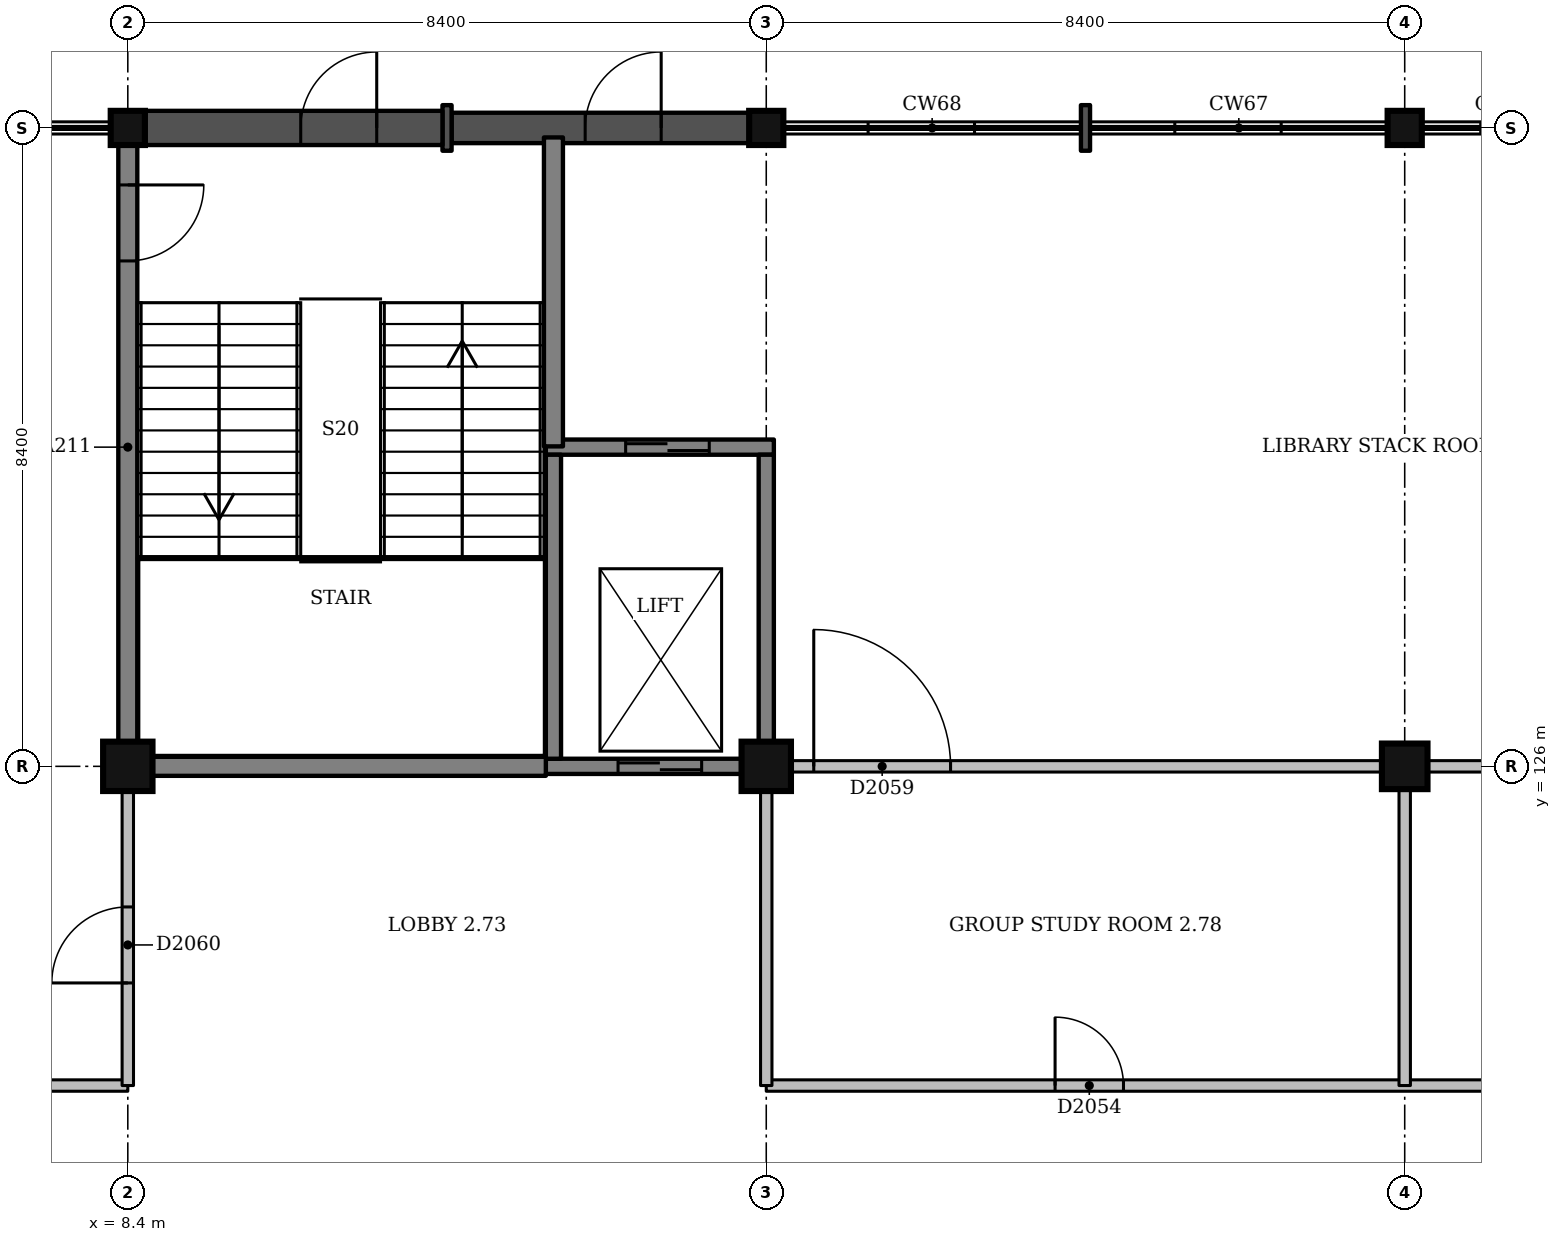
"""IFC4 building model, lengths in metres.
Left out: names, types, materials, properties, quantities, classifications, styles, units other than length and angle.
Written with IfcOpenShell. Run it as: python <this file> out.ifc"""

import sys

from ifc_helpers import new_model, si_unit, direction, frame, frame_2d, origin, origin_2d, place, context, subcontext, project, spatial, rectangle, extrude, element, fill, save


model = new_model("IFC4")
c1 = context("Model", 3, precision=1e-05, world=origin(), true_north=direction((0.0, 1.0)))
c2 = subcontext(c1, "Body", "Model", "MODEL_VIEW")
j1 = project(units=[si_unit("LENGTHUNIT", "METRE"), si_unit("PLANEANGLEUNIT", "RADIAN")], contexts=[c1])
p1 = place(None, origin())
s1 = spatial("IfcSite", under=j1, at=p1, CompositionType="ELEMENT")
p2 = place(p1, origin())
s2 = spatial("IfcBuilding", under=s1, at=p2, CompositionType="ELEMENT")
p3 = place(p2, frame((0.0, 0.0, 9.0)))
s3 = spatial("IfcBuildingStorey", under=s2, at=p3, CompositionType="ELEMENT", Elevation=9.0)
p4 = place(p3, frame((8.4, 126.0, -1.5), z_axis=(0.0, 0.0, 1.0), x_axis=(1.0, 0.0, 0.0)))
e1 = element("IfcColumn", 1, at=p4, inside=s3, PredefinedType="COLUMN", context=c2, shape_type="SweptSolid", body=[
    extrude(rectangle(XDim=0.65, YDim=0.65, at=origin_2d()), origin(), (0.0, 0.0, 1.0), 6.0),
])
p5 = place(p3, frame((8.4, 134.4, -1.5), z_axis=(0.0, 0.0, 1.0), x_axis=(1.0, 0.0, 0.0)))
e2 = element("IfcColumn", 2, at=p5, inside=s3, PredefinedType="COLUMN", context=c2, shape_type="SweptSolid", body=[
    extrude(rectangle(XDim=0.45, YDim=0.45, at=origin_2d()), origin(), (0.0, 0.0, 1.0), 6.0),
])
p6 = place(p3, frame((16.8, 126.0, -1.5), z_axis=(0.0, 0.0, 1.0), x_axis=(1.0, 0.0, 0.0)))
e3 = element("IfcColumn", 3, at=p6, inside=s3, PredefinedType="COLUMN", context=c2, shape_type="SweptSolid", body=[
    extrude(rectangle(XDim=0.65, YDim=0.65, at=origin_2d()), origin(), (0.0, 0.0, 1.0), 6.0),
])
p7 = place(p3, frame((16.8, 134.4, -1.5), z_axis=(0.0, 0.0, 1.0), x_axis=(1.0, 0.0, 0.0)))
e4 = element("IfcColumn", 4, at=p7, inside=s3, PredefinedType="COLUMN", context=c2, shape_type="SweptSolid", body=[
    extrude(rectangle(XDim=0.45, YDim=0.45, at=origin_2d()), origin(), (0.0, 0.0, 1.0), 6.0),
])
p8 = place(p3, frame((25.2, 126.0, -1.5), z_axis=(0.0, 0.0, 1.0), x_axis=(1.0, 0.0, 0.0)))
e5 = element("IfcColumn", 5, at=p8, inside=s3, PredefinedType="COLUMN", context=c2, shape_type="SweptSolid", body=[
    extrude(rectangle(XDim=0.6, YDim=0.6, at=origin_2d()), origin(), (0.0, 0.0, 1.0), 6.0),
])
p9 = place(p3, frame((25.2, 134.4, -1.5), z_axis=(0.0, 0.0, 1.0), x_axis=(1.0, 0.0, 0.0)))
e6 = element("IfcColumn", 6, at=p9, inside=s3, PredefinedType="COLUMN", context=c2, shape_type="SweptSolid", body=[
    extrude(rectangle(XDim=0.45, YDim=0.45, at=origin_2d()), origin(), (0.0, 0.0, 1.0), 6.0),
])
p10 = place(p3, frame((13.9, 126.0, 0.0), z_axis=(0.0, 0.0, 1.0), x_axis=(1.0, 0.0, 0.0)))
e7 = element("IfcWall", 7, at=p10, inside=s3, PredefinedType="SHEAR", context=c2, shape_type="SweptSolid", body=[
    extrude(rectangle(XDim=2.575, YDim=0.2, at=frame_2d((1.288, 0.0))), origin(), (0.0, 0.0, 1.0), 4.5),
])
p11 = place(p10, frame((0.95, 0.0, 0.0)))
e8 = element("IfcOpeningElement", 8, at=p11, cuts=e7, PredefinedType="OPENING", context=c2, shape_type="SweptSolid", body=[
    extrude(rectangle(XDim=1.1, YDim=2.1, at=frame_2d((0.55, 1.05))), frame((0.0, 0.11, 0.0), z_axis=(0.0, -1.0, 0.0), x_axis=(1.0, 0.0, 0.0)), (0.0, 0.0, 1.0), 0.22),
])
p12 = place(p3, frame((13.9, 130.2, 0.0), z_axis=(0.0, 0.0, 1.0), x_axis=(1.0, 0.0, 0.0)))
e9 = element("IfcWall", 9, at=p12, inside=s3, PredefinedType="SHEAR", context=c2, shape_type="SweptSolid", body=[
    extrude(rectangle(XDim=3.0, YDim=0.2, at=frame_2d((1.5, 0.0))), origin(), (0.0, 0.0, 1.0), 4.5),
])
p13 = place(p12, frame((1.05, 0.0, 0.0)))
e10 = element("IfcOpeningElement", 10, at=p13, cuts=e9, PredefinedType="OPENING", context=c2, shape_type="SweptSolid", body=[
    extrude(rectangle(XDim=1.1, YDim=2.1, at=frame_2d((0.55, 1.05))), frame((0.0, 0.11, 0.0), z_axis=(0.0, -1.0, 0.0), x_axis=(1.0, 0.0, 0.0)), (0.0, 0.0, 1.0), 0.22),
])
p14 = place(p3, frame((14.0, 126.1, 0.0), z_axis=(0.0, 0.0, 1.0), x_axis=(0.0, 1.0, 0.0)))
e11 = element("IfcWall", 11, at=p14, inside=s3, PredefinedType="SHEAR", context=c2, shape_type="SweptSolid", body=[
    extrude(rectangle(XDim=4.0, YDim=0.2, at=frame_2d((2.0, 0.0))), origin(), (0.0, 0.0, 1.0), 4.5),
])
p15 = place(p3, frame((16.8, 126.325, 0.0), z_axis=(0.0, 0.0, 1.0), x_axis=(0.0, 1.0, 0.0)))
e12 = element("IfcWall", 12, at=p15, inside=s3, PredefinedType="SHEAR", context=c2, shape_type="SweptSolid", body=[
    extrude(rectangle(XDim=3.775, YDim=0.2, at=frame_2d((1.888, 0.0))), origin(), (0.0, 0.0, 1.0), 4.5),
])
p16 = place(p3, frame((8.725, 126.0, 0.0), z_axis=(0.0, 0.0, 1.0), x_axis=(1.0, 0.0, 0.0)))
e13 = element("IfcWall", 13, at=p16, inside=s3, PredefinedType="SHEAR", context=c2, shape_type="SweptSolid", body=[
    extrude(rectangle(XDim=5.175, YDim=0.25, at=frame_2d((2.587, 0.0))), origin(), (0.0, 0.0, 1.0), 4.5),
])
p17 = place(p3, frame((8.4, 126.325, 0.0), z_axis=(0.0, 0.0, 1.0), x_axis=(0.0, 1.0, 0.0)))
e14 = element("IfcWall", 14, at=p17, inside=s3, PredefinedType="SHEAR", context=c2, shape_type="SweptSolid", body=[
    extrude(rectangle(XDim=7.85, YDim=0.25, at=frame_2d((3.925, 0.0))), origin(), (0.0, 0.0, 1.0), 4.5),
])
p18 = place(p17, frame((6.325, 0.0, 0.0)))
e15 = element("IfcOpeningElement", 15, at=p18, cuts=e14, PredefinedType="OPENING", context=c2, shape_type="SweptSolid", body=[
    extrude(rectangle(XDim=1.0, YDim=2.1, at=frame_2d((0.5, 1.05))), frame((0.0, 0.135, 0.0), z_axis=(0.0, -1.0, 0.0), x_axis=(1.0, 0.0, 0.0)), (0.0, 0.0, 1.0), 0.27),
])
p19 = place(p3, frame((14.0, 130.21, 0.0), z_axis=(0.0, 0.0, 1.0), x_axis=(0.0, 1.0, 0.0)))
e16 = element("IfcWall", 16, at=p19, inside=s3, PredefinedType="SHEAR", context=c2, shape_type="SweptSolid", body=[
    extrude(rectangle(XDim=4.065, YDim=0.25, at=frame_2d((2.032, 0.0))), origin(), (0.0, 0.0, 1.0), 4.5),
])
p20 = place(p3, frame((21.06, 134.4, 0.0), z_axis=(0.0, 0.0, 1.0), x_axis=(-1.0, 0.0, 0.0)))
e17 = element("IfcWall", 17, at=p20, inside=s3, PredefinedType="SOLIDWALL", context=c2, shape_type="SweptSolid", body=[
    extrude(rectangle(XDim=0.12, YDim=0.6, at=frame_2d((0.06, 0.0))), origin(), (0.0, 0.0, 1.0), 3.35),
])
p21 = place(p3, frame((16.575, 134.4, 0.0), z_axis=(0.0, 0.0, 1.0), x_axis=(-1.0, 0.0, 0.0)))
e18 = element("IfcWall", 18, at=p21, inside=s3, PredefinedType="SOLIDWALL", context=c2, shape_type="SweptSolid", body=[
    extrude(rectangle(XDim=3.915, YDim=0.4, at=frame_2d((1.958, 0.0))), origin(), (0.0, 0.0, 1.0), 3.35),
])
p22 = place(p21, frame((1.157, 0.0, 0.0)))
e19 = element("IfcOpeningElement", 19, at=p22, cuts=e18, PredefinedType="OPENING", context=c2, shape_type="SweptSolid", body=[
    extrude(rectangle(XDim=1.0, YDim=2.1, at=frame_2d((0.5, 1.05))), frame((0.0, 0.21, 0.0), z_axis=(0.0, -1.0, 0.0), x_axis=(1.0, 0.0, 0.0)), (0.0, 0.0, 1.0), 0.42),
])
p23 = place(p3, frame((12.66, 134.4, 0.0), z_axis=(0.0, 0.0, 1.0), x_axis=(-1.0, 0.0, 0.0)))
e20 = element("IfcWall", 20, at=p23, inside=s3, PredefinedType="SOLIDWALL", context=c2, shape_type="SweptSolid", body=[
    extrude(rectangle(XDim=0.12, YDim=0.6, at=frame_2d((0.06, 0.0))), origin(), (0.0, 0.0, 1.0), 3.35),
])
p24 = place(p3, frame((12.54, 134.4, 0.0), z_axis=(0.0, 0.0, 1.0), x_axis=(-1.0, 0.0, 0.0)))
e21 = element("IfcWall", 21, at=p24, inside=s3, PredefinedType="SOLIDWALL", context=c2, shape_type="SweptSolid", body=[
    extrude(rectangle(XDim=3.915, YDim=0.45, at=frame_2d((1.958, 0.0))), origin(), (0.0, 0.0, 1.0), 3.35),
])
p25 = place(p24, frame((1.865, 0.0, 0.0), z_axis=(0.0, 0.0, 1.0), x_axis=(-1.0, 0.0, 0.0)))
e22 = element("IfcOpeningElement", 22, at=p25, cuts=e21, PredefinedType="OPENING", context=c2, shape_type="SweptSolid", body=[
    extrude(rectangle(XDim=1.0, YDim=2.1, at=frame_2d((0.5, 1.05))), frame((0.0, 0.235, 0.0), z_axis=(0.0, -1.0, 0.0), x_axis=(1.0, 0.0, 0.0)), (0.0, 0.0, 1.0), 0.47),
])
p26 = place(p3, frame((0.275, 121.8, 0.0), z_axis=(0.0, 0.0, 1.0), x_axis=(1.0, 0.0, 0.0)))
e23 = element("IfcWall", 23, at=p26, inside=s3, PredefinedType="PARTITIONING", context=c2, shape_type="SweptSolid", body=[
    extrude(rectangle(XDim=8.125, YDim=0.15, at=frame_2d((4.062, 0.0))), origin(), (0.0, 0.0, 1.0), 3.4),
])
p27 = place(p3, frame((16.8, 121.8, 0.0), z_axis=(0.0, 0.0, 1.0), x_axis=(1.0, 0.0, 0.0)))
e24 = element("IfcWall", 24, at=p27, inside=s3, PredefinedType="PARTITIONING", context=c2, shape_type="SweptSolid", body=[
    extrude(rectangle(XDim=25.2, YDim=0.15, at=frame_2d((12.6, 0.0))), origin(), (0.0, 0.0, 1.0), 3.4),
])
p28 = place(p27, frame((3.8, 0.0, 0.0)))
e25 = element("IfcOpeningElement", 25, at=p28, cuts=e24, PredefinedType="OPENING", context=c2, shape_type="SweptSolid", body=[
    extrude(rectangle(XDim=0.9, YDim=2.1, at=frame_2d((0.45, 1.05))), frame((0.0, 0.085, 0.0), z_axis=(0.0, -1.0, 0.0), x_axis=(1.0, 0.0, 0.0)), (0.0, 0.0, 1.0), 0.17),
])
p29 = place(p27, frame((12.2, 0.0, 0.0)))
e26 = element("IfcOpeningElement", 26, at=p29, cuts=e24, PredefinedType="OPENING", context=c2, shape_type="SweptSolid", body=[
    extrude(rectangle(XDim=0.9, YDim=2.1, at=frame_2d((0.45, 1.05))), frame((0.0, 0.085, 0.0), z_axis=(0.0, -1.0, 0.0), x_axis=(1.0, 0.0, 0.0)), (0.0, 0.0, 1.0), 0.17),
])
p30 = place(p27, frame((20.6, 0.0, 0.0)))
e27 = element("IfcOpeningElement", 27, at=p30, cuts=e24, PredefinedType="OPENING", context=c2, shape_type="SweptSolid", body=[
    extrude(rectangle(XDim=0.9, YDim=2.1, at=frame_2d((0.45, 1.05))), frame((0.0, 0.085, 0.0), z_axis=(0.0, -1.0, 0.0), x_axis=(1.0, 0.0, 0.0)), (0.0, 0.0, 1.0), 0.17),
])
p31 = place(p3, frame((17.125, 126.0, 0.0), z_axis=(0.0, 0.0, 1.0), x_axis=(1.0, 0.0, 0.0)))
e28 = element("IfcWall", 28, at=p31, inside=s3, PredefinedType="PARTITIONING", context=c2, shape_type="SweptSolid", body=[
    extrude(rectangle(XDim=7.775, YDim=0.15, at=frame_2d((3.887, 0.0))), origin(), (0.0, 0.0, 1.0), 3.4),
])
p32 = place(p31, frame((0.3, 0.0, 0.0)))
e29 = element("IfcOpeningElement", 29, at=p32, cuts=e28, PredefinedType="OPENING", context=c2, shape_type="SweptSolid", body=[
    extrude(rectangle(XDim=1.8, YDim=2.1, at=frame_2d((0.9, 1.05))), frame((0.0, 0.085, 0.0), z_axis=(0.0, -1.0, 0.0), x_axis=(1.0, 0.0, 0.0)), (0.0, 0.0, 1.0), 0.17),
])
p33 = place(p3, frame((25.5, 126.0, 0.0), z_axis=(0.0, 0.0, 1.0), x_axis=(1.0, 0.0, 0.0)))
e30 = element("IfcWall", 30, at=p33, inside=s3, PredefinedType="PARTITIONING", context=c2, shape_type="SweptSolid", body=[
    extrude(rectangle(XDim=7.8, YDim=0.15, at=frame_2d((3.9, 0.0))), origin(), (0.0, 0.0, 1.0), 3.4),
])
p34 = place(p3, frame((8.4, 121.8, 0.0), z_axis=(0.0, 0.0, 1.0), x_axis=(0.0, 1.0, 0.0)))
e31 = element("IfcWall", 31, at=p34, inside=s3, PredefinedType="PARTITIONING", context=c2, shape_type="SweptSolid", body=[
    extrude(rectangle(XDim=3.875, YDim=0.15, at=frame_2d((1.938, 0.0))), origin(), (0.0, 0.0, 1.0), 3.4),
])
p35 = place(p34, frame((1.35, 0.0, 0.0)))
e32 = element("IfcOpeningElement", 32, at=p35, cuts=e31, PredefinedType="OPENING", context=c2, shape_type="SweptSolid", body=[
    extrude(rectangle(XDim=1.0, YDim=2.1, at=frame_2d((0.5, 1.05))), frame((0.0, 0.085, 0.0), z_axis=(0.0, -1.0, 0.0), x_axis=(1.0, 0.0, 0.0)), (0.0, 0.0, 1.0), 0.17),
])
p36 = place(p3, frame((16.8, 121.8, 0.0), z_axis=(0.0, 0.0, 1.0), x_axis=(0.0, 1.0, 0.0)))
e33 = element("IfcWall", 33, at=p36, inside=s3, PredefinedType="PARTITIONING", context=c2, shape_type="SweptSolid", body=[
    extrude(rectangle(XDim=3.875, YDim=0.15, at=frame_2d((1.938, 0.0))), origin(), (0.0, 0.0, 1.0), 3.4),
])
p37 = place(p3, frame((25.2, 121.8, 0.0), z_axis=(0.0, 0.0, 1.0), x_axis=(0.0, 1.0, 0.0)))
e34 = element("IfcWall", 34, at=p37, inside=s3, PredefinedType="PARTITIONING", context=c2, shape_type="SweptSolid", body=[
    extrude(rectangle(XDim=3.9, YDim=0.15, at=frame_2d((1.95, 0.0))), origin(), (0.0, 0.0, 1.0), 3.4),
])
p38 = place(p22, origin())
e35 = element("IfcDoor", 35, at=p38, inside=s3, OperationType="SINGLE_SWING_LEFT", PredefinedType="DOOR", context=c2, shape_type="SweptSolid", body=[
    extrude(rectangle(XDim=1.0, YDim=2.1, at=frame_2d((0.5, 1.05))), frame((0.0, 0.025, 0.0), z_axis=(0.0, -1.0, 0.0), x_axis=(1.0, 0.0, 0.0)), (0.0, 0.0, 1.0), 0.05),
])
fill(e19, e35)
p39 = place(p28, origin())
e36 = element("IfcDoor", 36, at=p39, inside=s3, OperationType="SINGLE_SWING_LEFT", PredefinedType="DOOR", context=c2, shape_type="SweptSolid", body=[
    extrude(rectangle(XDim=0.9, YDim=2.1, at=frame_2d((0.45, 1.05))), frame((0.0, 0.025, 0.0), z_axis=(0.0, -1.0, 0.0), x_axis=(1.0, 0.0, 0.0)), (0.0, 0.0, 1.0), 0.05),
])
fill(e25, e36)
p40 = place(p32, origin())
e37 = element("IfcDoor", 37, at=p40, inside=s3, OperationType="DOUBLE_DOOR_SINGLE_SWING", PredefinedType="DOOR", context=c2, shape_type="SweptSolid", body=[
    extrude(rectangle(XDim=1.8, YDim=2.1, at=frame_2d((0.9, 1.05))), frame((0.0, 0.025, 0.0), z_axis=(0.0, -1.0, 0.0), x_axis=(1.0, 0.0, 0.0)), (0.0, 0.0, 1.0), 0.05),
])
fill(e29, e37)
p41 = place(p35, origin())
e38 = element("IfcDoor", 38, at=p41, inside=s3, OperationType="SINGLE_SWING_LEFT", PredefinedType="DOOR", context=c2, shape_type="SweptSolid", body=[
    extrude(rectangle(XDim=1.0, YDim=2.1, at=frame_2d((0.5, 1.05))), frame((0.0, 0.025, 0.0), z_axis=(0.0, -1.0, 0.0), x_axis=(1.0, 0.0, 0.0)), (0.0, 0.0, 1.0), 0.05),
])
fill(e32, e38)
p42 = place(p18, origin())
e39 = element("IfcDoor", 39, at=p42, inside=s3, OperationType="SINGLE_SWING_RIGHT", PredefinedType="DOOR", context=c2, shape_type="SweptSolid", body=[
    extrude(rectangle(XDim=1.0, YDim=2.1, at=frame_2d((0.5, 1.05))), frame((0.0, 0.025, 0.0), z_axis=(0.0, -1.0, 0.0), x_axis=(1.0, 0.0, 0.0)), (0.0, 0.0, 1.0), 0.05),
])
fill(e15, e39)
p43 = place(p25, origin())
e40 = element("IfcDoor", 40, at=p43, inside=s3, OperationType="SINGLE_SWING_LEFT", PredefinedType="DOOR", context=c2, shape_type="SweptSolid", body=[
    extrude(rectangle(XDim=1.0, YDim=2.1, at=frame_2d((0.5, 1.05))), frame((0.0, 0.025, 0.0), z_axis=(0.0, -1.0, 0.0), x_axis=(1.0, 0.0, 0.0)), (0.0, 0.0, 1.0), 0.05),
])
fill(e22, e40)
p44 = place(p11, origin())
e41 = element("IfcDoor", 41, at=p44, inside=s3, OperationType="SLIDING_TO_LEFT", PredefinedType="DOOR", context=c2, shape_type="SweptSolid", body=[
    extrude(rectangle(XDim=1.1, YDim=2.1, at=frame_2d((0.55, 1.05))), frame((0.0, 0.025, 0.0), z_axis=(0.0, -1.0, 0.0), x_axis=(1.0, 0.0, 0.0)), (0.0, 0.0, 1.0), 0.05),
])
fill(e8, e41)
p45 = place(p13, origin())
e42 = element("IfcDoor", 42, at=p45, inside=s3, OperationType="SLIDING_TO_RIGHT", PredefinedType="DOOR", context=c2, shape_type="SweptSolid", body=[
    extrude(rectangle(XDim=1.1, YDim=2.1, at=frame_2d((0.55, 1.05))), frame((0.0, 0.025, 0.0), z_axis=(0.0, -1.0, 0.0), x_axis=(1.0, 0.0, 0.0)), (0.0, 0.0, 1.0), 0.05),
])
fill(e10, e42)
save(model, sys.argv[1])
